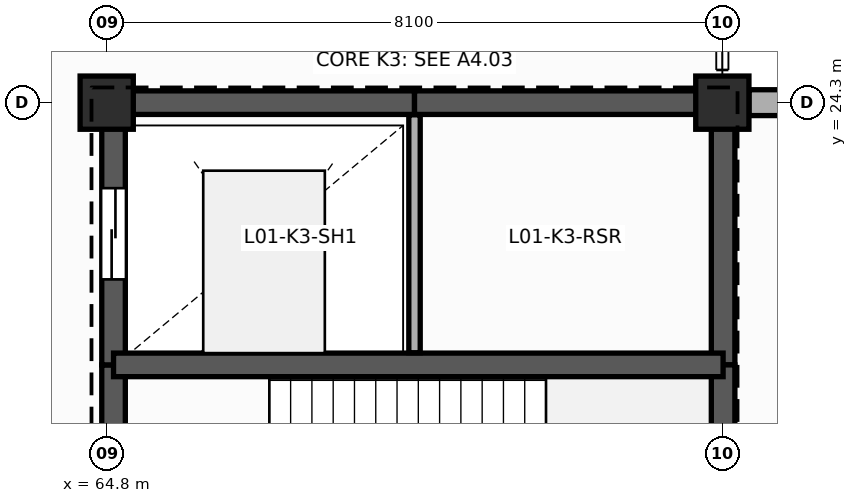
"""IFC4 building model, lengths in metres.
Left out: names, types, materials, properties, quantities, classifications, styles, units other than length and angle.
Written with IfcOpenShell. Run it as: python <this file> out.ifc"""

import sys

from ifc_helpers import new_model, si_unit, direction, frame, frame_2d, origin, origin_2d, place, context, subcontext, project, spatial, rectangle, extrude, element, fill, save


model = new_model("IFC4")
c1 = context("Model", 3, precision=1e-05, world=origin(), true_north=direction((0.0, 1.0)))
c2 = subcontext(c1, "Body", "Model", "MODEL_VIEW")
j1 = project(units=[si_unit("LENGTHUNIT", "METRE"), si_unit("PLANEANGLEUNIT", "RADIAN")], contexts=[c1])
p1 = place(None, origin())
s1 = spatial("IfcSite", under=j1, at=p1, CompositionType="ELEMENT")
p2 = place(p1, origin())
s2 = spatial("IfcBuilding", under=s1, at=p2, CompositionType="ELEMENT")
p3 = place(p2, frame((0.0, 0.0, 5.4)))
s3 = spatial("IfcBuildingStorey", under=s2, at=p3, CompositionType="ELEMENT", Elevation=5.4)
for number, where, z_axis, x_axis in (
    (1, (64.8, 24.3, 0.0), (0.0, 0.0, 1.0), (1.0, 0.0, 0.0)),
    (2, (72.9, 24.3, 0.0), (0.0, 0.0, 1.0), (1.0, 0.0, 0.0)),
):
    element("IfcColumn", number, at=place(p3, frame(where, z_axis=z_axis, x_axis=x_axis)), inside=s3, PredefinedType="COLUMN", context=c2, shape_type="SweptSolid", body=[
        extrude(rectangle(XDim=0.7, YDim=0.7, at=origin_2d()), origin(), (0.0, 0.0, 1.0), 4.8),
    ])
p4 = place(p3, frame((80.7, 24.3, 0.0), z_axis=(0.0, 0.0, 1.0), x_axis=(-1.0, 0.0, 0.0)))
e3 = element("IfcWall", 3, at=p4, inside=s3, PredefinedType="SOLIDWALL", context=c2, shape_type="SweptSolid", body=[
    extrude(rectangle(XDim=7.45, YDim=0.34, at=frame_2d((3.725, 0.0))), origin(), (0.0, 0.0, 1.0), 4.8),
])
p5 = place(p3, frame((64.89, 16.45, 0.0), z_axis=(0.0, 0.0, 1.0), x_axis=(0.0, 1.0, 0.0)))
e4 = element("IfcWall", 4, at=p5, inside=s3, PredefinedType="SHEAR", context=c2, shape_type="SweptSolid", body=[
    extrude(rectangle(XDim=4.4, YDim=0.31, at=frame_2d((2.2, 0.0))), origin(), (0.0, 0.0, 1.0), 4.8),
])
p6 = place(p5, frame((1.35, 0.0, 0.0)))
e5 = element("IfcOpeningElement", 5, at=p6, cuts=e4, PredefinedType="OPENING", context=c2, shape_type="SweptSolid", body=[
    extrude(rectangle(XDim=1.2, YDim=2.25, at=frame_2d((0.6, 1.125))), frame((0.0, 0.165, 0.0), z_axis=(0.0, -1.0, 0.0), x_axis=(1.0, 0.0, 0.0)), (0.0, 0.0, 1.0), 0.33),
])
p7 = place(p3, frame((64.89, 20.85, 0.0), z_axis=(0.0, 0.0, 1.0), x_axis=(0.0, 1.0, 0.0)))
e6 = element("IfcWall", 6, at=p7, inside=s3, PredefinedType="SHEAR", context=c2, shape_type="SweptSolid", body=[
    extrude(rectangle(XDim=3.45, YDim=0.31, at=frame_2d((1.725, 0.0))), origin(), (0.0, 0.0, 1.0), 4.8),
])
p8 = place(p7, frame((1.125, 0.0, 0.0)))
e7 = element("IfcOpeningElement", 7, at=p8, cuts=e6, PredefinedType="OPENING", context=c2, shape_type="SweptSolid", body=[
    extrude(rectangle(XDim=1.2, YDim=2.2, at=frame_2d((0.6, 1.1))), frame((0.0, 0.165, 0.0), z_axis=(0.0, -1.0, 0.0), x_axis=(1.0, 0.0, 0.0)), (0.0, 0.0, 1.0), 0.33),
])
p9 = place(p3, frame((64.89, 24.3, 0.0), z_axis=(0.0, 0.0, 1.0), x_axis=(1.0, 0.0, 0.0)))
e8 = element("IfcWall", 8, at=p9, inside=s3, PredefinedType="SHEAR", context=c2, shape_type="SweptSolid", body=[
    extrude(rectangle(XDim=3.96, YDim=0.31, at=frame_2d((1.98, 0.0))), origin(), (0.0, 0.0, 1.0), 4.8),
])
p10 = place(p3, frame((68.85, 24.3, 0.0), z_axis=(0.0, 0.0, 1.0), x_axis=(1.0, 0.0, 0.0)))
e9 = element("IfcWall", 9, at=p10, inside=s3, PredefinedType="SHEAR", context=c2, shape_type="SweptSolid", body=[
    extrude(rectangle(XDim=4.06, YDim=0.31, at=frame_2d((2.03, 0.0))), origin(), (0.0, 0.0, 1.0), 4.8),
])
p11 = place(p3, frame((72.91, 24.3, 0.0), z_axis=(0.0, 0.0, 1.0), x_axis=(0.0, -1.0, 0.0)))
e10 = element("IfcWall", 10, at=p11, inside=s3, PredefinedType="SHEAR", context=c2, shape_type="SweptSolid", body=[
    extrude(rectangle(XDim=3.45, YDim=0.31, at=frame_2d((1.725, 0.0))), origin(), (0.0, 0.0, 1.0), 4.8),
])
p12 = place(p3, frame((72.91, 20.85, 0.0), z_axis=(0.0, 0.0, 1.0), x_axis=(0.0, -1.0, 0.0)))
e11 = element("IfcWall", 11, at=p12, inside=s3, PredefinedType="SHEAR", context=c2, shape_type="SweptSolid", body=[
    extrude(rectangle(XDim=4.4, YDim=0.31, at=frame_2d((2.2, 0.0))), origin(), (0.0, 0.0, 1.0), 4.8),
])
p13 = place(p3, frame((64.89, 20.85, 0.0), z_axis=(0.0, 0.0, 1.0), x_axis=(1.0, 0.0, 0.0)))
e12 = element("IfcWall", 12, at=p13, inside=s3, PredefinedType="SHEAR", context=c2, shape_type="SweptSolid", body=[
    extrude(rectangle(XDim=8.02, YDim=0.31, at=frame_2d((4.01, 0.0))), origin(), (0.0, 0.0, 1.0), 4.8),
])
p14 = place(p3, frame((68.85, 21.01, 0.0), z_axis=(0.0, 0.0, 1.0), x_axis=(0.0, 1.0, 0.0)))
e13 = element("IfcWall", 13, at=p14, inside=s3, PredefinedType="PLUMBINGWALL", context=c2, shape_type="SweptSolid", body=[
    extrude(rectangle(XDim=3.13, YDim=0.15, at=frame_2d((1.565, 0.0))), origin(), (0.0, 0.0, 1.0), 4.45),
])
p15 = place(p8, origin())
e14 = element("IfcDoor", 14, at=p15, inside=s3, OperationType="SLIDING_TO_LEFT", PredefinedType="DOOR", context=c2, shape_type="SweptSolid", body=[
    extrude(rectangle(XDim=1.2, YDim=2.2, at=frame_2d((0.6, 1.1))), frame((0.0, 0.025, 0.0), z_axis=(0.0, -1.0, 0.0), x_axis=(1.0, 0.0, 0.0)), (0.0, 0.0, 1.0), 0.05),
])
fill(e7, e14)
save(model, sys.argv[1])
